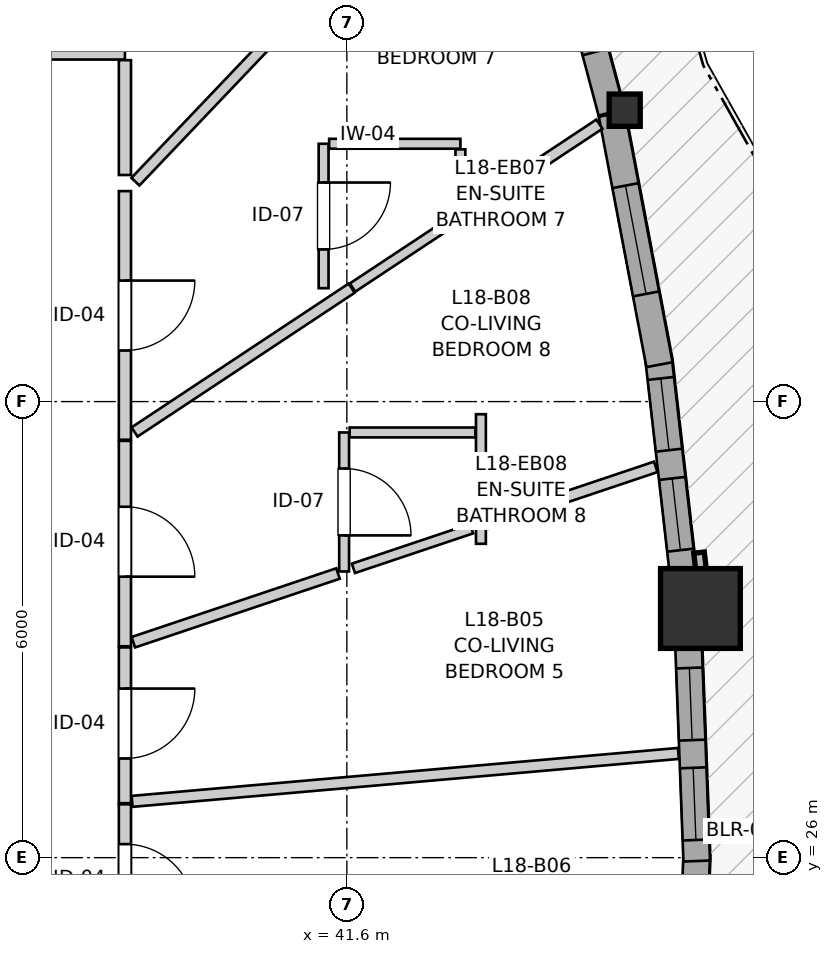
"""IFC4 building model, lengths in metres.
Left out: names, types, materials, properties, quantities, classifications, styles, units other than length and angle.
Written with IfcOpenShell. Run it as: python <this file> out.ifc"""

import sys

from ifc_helpers import new_model, si_unit, direction, frame, frame_2d, origin, origin_2d, place, context, subcontext, project, spatial, rectangle, i_section, extrude, source, transform, mapped, element, fill, save


model = new_model("IFC4")
c1 = context("Model", 3, precision=1e-05, world=origin(), true_north=direction((0.0, 1.0)))
c2 = subcontext(c1, "Body", "Model", "MODEL_VIEW")
j1 = project(units=[si_unit("LENGTHUNIT", "METRE"), si_unit("PLANEANGLEUNIT", "RADIAN")], contexts=[c1])
p1 = place(None, origin())
s1 = spatial("IfcSite", under=j1, at=p1, CompositionType="ELEMENT")
p2 = place(p1, origin())
s2 = spatial("IfcBuilding", under=s1, at=p2, CompositionType="ELEMENT")
p3 = place(p2, frame((0.0, 0.0, 62.2)))
s3 = spatial("IfcBuildingStorey", under=s2, at=p3, CompositionType="ELEMENT", Elevation=62.2)
m1 = source(origin(), c2, "Body", "SweptSolid", [
    extrude(rectangle(XDim=1.05, YDim=1.05, at=origin_2d()), origin(), (0.0, 0.0, 1.0), 2.9),
])
p4 = place(p3, frame((46.252, 29.278, 0.0), z_axis=(0.0, 0.0, 1.0), x_axis=(1.0, 0.0, 0.0)))
e1 = element("IfcColumn", 1, at=p4, inside=s3, PredefinedType="COLUMN", context=c2, shape_type="MappedRepresentation", body=[
    mapped(m1, transform((0.0, 0.0, 0.0), x_axis=(1.0, 0.0, 0.0), y_axis=(0.0, 1.0, 0.0), z_axis=(0.0, 0.0, 1.0), scale=1.0)),
])
m2 = source(origin(), c2, "Body", "SweptSolid", [
    extrude(i_section(OverallWidth=0.409, OverallDepth=0.425, WebThickness=0.03, FlangeThickness=0.048, FilletRadius=0.015, at=origin_2d()), origin(), (0.0, 0.0, 1.0), 2.9),
])
p5 = place(p3, frame((45.256, 35.834, 0.0), z_axis=(0.0, 0.0, 1.0), x_axis=(1.0, 0.0, 0.0)))
e2 = element("IfcColumn", 2, at=p5, inside=s3, PredefinedType="PILASTER", context=c2, shape_type="MappedRepresentation", body=[
    mapped(m2, transform((0.0, 0.0, 0.0), x_axis=(1.0, 0.0, 0.0), y_axis=(0.0, 1.0, 0.0), z_axis=(0.0, 0.0, 1.0), scale=1.0)),
])
p6 = place(p3, frame((46.078, 22.749, 0.0), z_axis=(0.0, 0.0, 1.0), x_axis=(0.037972593677, 0.999278780986, 0.0)))
e3 = element("IfcWall", 3, at=p6, inside=s3, PredefinedType="SOLIDWALL", context=c2, shape_type="SweptSolid", body=[
    extrude(rectangle(XDim=3.298, YDim=0.35, at=frame_2d((1.649, 0.0))), origin(), (0.0, 0.0, 1.0), 2.38),
])
p7 = place(p6, frame((1.394, 0.0, 0.82)))
e4 = element("IfcOpeningElement", 4, at=p7, cuts=e3, PredefinedType="OPENING", context=c2, shape_type="SweptSolid", body=[
    extrude(rectangle(XDim=1.25, YDim=1.35, at=frame_2d((0.625, 0.675))), frame((0.0, 0.185, 0.0), z_axis=(0.0, -1.0, 0.0), x_axis=(1.0, 0.0, 0.0)), (0.0, 0.0, 1.0), 0.37),
])
p8 = place(p3, frame((46.203, 25.955, 0.0), z_axis=(0.0, 0.0, 1.0), x_axis=(-0.038016855762, 0.999277098045, 0.0)))
e5 = element("IfcWall", 5, at=p8, inside=s3, PredefinedType="SOLIDWALL", context=c2, shape_type="SweptSolid", body=[
    extrude(rectangle(XDim=3.018, YDim=0.35, at=frame_2d((1.509, 0.0))), origin(), (0.0, 0.0, 1.0), 2.38),
])
p9 = place(p8, frame((0.277, 0.0, 0.82)))
e6 = element("IfcOpeningElement", 6, at=p9, cuts=e5, PredefinedType="OPENING", context=c2, shape_type="SweptSolid", body=[
    extrude(rectangle(XDim=0.95, YDim=1.35, at=frame_2d((0.475, 0.675))), frame((0.0, 0.185, 0.0), z_axis=(0.0, -1.0, 0.0), x_axis=(1.0, 0.0, 0.0)), (0.0, 0.0, 1.0), 0.37),
])
p10 = place(p8, frame((1.592, 0.0, 0.82)))
e7 = element("IfcOpeningElement", 7, at=p10, cuts=e5, PredefinedType="OPENING", context=c2, shape_type="SweptSolid", body=[
    extrude(rectangle(XDim=0.95, YDim=1.35, at=frame_2d((0.475, 0.675))), frame((0.0, 0.185, 0.0), z_axis=(0.0, -1.0, 0.0), x_axis=(1.0, 0.0, 0.0)), (0.0, 0.0, 1.0), 0.37),
])
p11 = place(p3, frame((46.044, 29.556, 0.0), z_axis=(0.0, 0.0, 1.0), x_axis=(-0.113263196818, 0.993565019637, 0.0)))
e8 = element("IfcWall", 8, at=p11, inside=s3, PredefinedType="SOLIDWALL", context=c2, shape_type="SweptSolid", body=[
    extrude(rectangle(XDim=3.037, YDim=0.35, at=frame_2d((1.519, 0.0))), origin(), (0.0, 0.0, 1.0), 2.38),
])
p12 = place(p11, frame((0.492, 0.0, 0.82)))
e9 = element("IfcOpeningElement", 9, at=p12, cuts=e8, PredefinedType="OPENING", context=c2, shape_type="SweptSolid", body=[
    extrude(rectangle(XDim=0.95, YDim=1.35, at=frame_2d((0.475, 0.675))), frame((0.0, 0.185, 0.0), z_axis=(0.0, -1.0, 0.0), x_axis=(1.0, 0.0, 0.0)), (0.0, 0.0, 1.0), 0.37),
])
p13 = place(p11, frame((1.816, 0.0, 0.82)))
e10 = element("IfcOpeningElement", 10, at=p13, cuts=e8, PredefinedType="OPENING", context=c2, shape_type="SweptSolid", body=[
    extrude(rectangle(XDim=0.95, YDim=1.35, at=frame_2d((0.475, 0.675))), frame((0.0, 0.185, 0.0), z_axis=(0.0, -1.0, 0.0), x_axis=(1.0, 0.0, 0.0)), (0.0, 0.0, 1.0), 0.37),
])
p14 = place(p3, frame((45.713, 32.486, 0.0), z_axis=(0.0, 0.0, 1.0), x_axis=(-0.186603748992, 0.982435260392, 0.0)))
e11 = element("IfcWall", 11, at=p14, inside=s3, PredefinedType="SOLIDWALL", context=c2, shape_type="SweptSolid", body=[
    extrude(rectangle(XDim=3.354, YDim=0.35, at=frame_2d((1.677, 0.0))), origin(), (0.0, 0.0, 1.0), 2.38),
])
p15 = place(p14, frame((0.948, 0.0, 0.82)))
e12 = element("IfcOpeningElement", 12, at=p15, cuts=e11, PredefinedType="OPENING", context=c2, shape_type="SweptSolid", body=[
    extrude(rectangle(XDim=1.45, YDim=1.25, at=frame_2d((0.725, 0.625))), frame((0.0, 0.185, 0.0), z_axis=(0.0, -1.0, 0.0), x_axis=(1.0, 0.0, 0.0)), (0.0, 0.0, 1.0), 0.37),
])
p16 = place(p3, frame((45.081, 35.808, 0.0), z_axis=(0.0, 0.0, 1.0), x_axis=(-0.257114470429, 0.966380954436, 0.0)))
e13 = element("IfcWall", 13, at=p16, inside=s3, PredefinedType="SOLIDWALL", context=c2, shape_type="SweptSolid", body=[
    extrude(rectangle(XDim=3.41, YDim=0.35, at=frame_2d((1.705, 0.0))), origin(), (0.0, 0.0, 1.0), 2.38),
])
p17 = place(p16, frame((0.82, 0.0, 0.82)))
e14 = element("IfcOpeningElement", 14, at=p17, cuts=e13, PredefinedType="OPENING", context=c2, shape_type="SweptSolid", body=[
    extrude(rectangle(XDim=1.75, YDim=1.3, at=frame_2d((0.875, 0.65))), frame((0.0, 0.185, 0.0), z_axis=(0.0, -1.0, 0.0), x_axis=(1.0, 0.0, 0.0)), (0.0, 0.0, 1.0), 0.37),
])
p18 = place(p3, frame((35.011, 36.58, 0.0), z_axis=(0.0, 0.0, 1.0), x_axis=(1.0, 0.0, 0.0)))
e15 = element("IfcWall", 15, at=p18, inside=s3, PredefinedType="PARTITIONING", context=c2, shape_type="SweptSolid", body=[
    extrude(rectangle(XDim=3.669, YDim=0.16, at=frame_2d((1.834, 0.0))), origin(), (0.0, 0.0, 1.0), 2.9),
])
p19 = place(p18, frame((1.363, 0.0, 0.0)))
e16 = element("IfcOpeningElement", 16, at=p19, cuts=e15, PredefinedType="OPENING", context=c2, shape_type="SweptSolid", body=[
    extrude(rectangle(XDim=0.96, YDim=2.1, at=frame_2d((0.48, 1.05))), frame((0.0, 0.09, 0.0), z_axis=(0.0, -1.0, 0.0), x_axis=(1.0, 0.0, 0.0)), (0.0, 0.0, 1.0), 0.18),
])
p20 = place(p3, frame((38.68, 34.769, 0.0), z_axis=(0.0, 0.0, 1.0), x_axis=(0.0, -1.0, 0.0)))
e17 = element("IfcWall", 17, at=p20, inside=s3, PredefinedType="PARTITIONING", context=c2, shape_type="SweptSolid", body=[
    extrude(rectangle(XDim=3.271, YDim=0.16, at=frame_2d((1.635, 0.0))), origin(), (0.0, 0.0, 1.0), 2.9),
])
p21 = place(p20, frame((1.177, 0.0, 0.0)))
e18 = element("IfcOpeningElement", 18, at=p21, cuts=e17, PredefinedType="OPENING", context=c2, shape_type="SweptSolid", body=[
    extrude(rectangle(XDim=0.92, YDim=2.1, at=frame_2d((0.46, 1.05))), frame((0.0, 0.09, 0.0), z_axis=(0.0, -1.0, 0.0), x_axis=(1.0, 0.0, 0.0)), (0.0, 0.0, 1.0), 0.18),
])
p22 = place(p3, frame((38.68, 31.483, 0.0), z_axis=(0.0, 0.0, 1.0), x_axis=(0.0, -1.0, 0.0)))
e19 = element("IfcWall", 19, at=p22, inside=s3, PredefinedType="PARTITIONING", context=c2, shape_type="SweptSolid", body=[
    extrude(rectangle(XDim=2.702, YDim=0.16, at=frame_2d((1.351, 0.0))), origin(), (0.0, 0.0, 1.0), 2.9),
])
p23 = place(p22, frame((0.866, 0.0, 0.0)))
e20 = element("IfcOpeningElement", 20, at=p23, cuts=e19, PredefinedType="OPENING", context=c2, shape_type="SweptSolid", body=[
    extrude(rectangle(XDim=0.92, YDim=2.1, at=frame_2d((0.46, 1.05))), frame((0.0, 0.09, 0.0), z_axis=(0.0, -1.0, 0.0), x_axis=(1.0, 0.0, 0.0)), (0.0, 0.0, 1.0), 0.18),
])
p24 = place(p3, frame((38.68, 28.766, 0.0), z_axis=(0.0, 0.0, 1.0), x_axis=(0.0, -1.0, 0.0)))
e21 = element("IfcWall", 21, at=p24, inside=s3, PredefinedType="PARTITIONING", context=c2, shape_type="SweptSolid", body=[
    extrude(rectangle(XDim=2.049, YDim=0.16, at=frame_2d((1.024, 0.0))), origin(), (0.0, 0.0, 1.0), 2.9),
])
p25 = place(p24, frame((0.542, 0.0, 0.0)))
e22 = element("IfcOpeningElement", 22, at=p25, cuts=e21, PredefinedType="OPENING", context=c2, shape_type="SweptSolid", body=[
    extrude(rectangle(XDim=0.92, YDim=2.1, at=frame_2d((0.46, 1.05))), frame((0.0, 0.09, 0.0), z_axis=(0.0, -1.0, 0.0), x_axis=(1.0, 0.0, 0.0)), (0.0, 0.0, 1.0), 0.18),
])
p26 = place(p3, frame((38.68, 26.702, 0.0), z_axis=(0.0, 0.0, 1.0), x_axis=(0.0, -1.0, 0.0)))
e23 = element("IfcWall", 23, at=p26, inside=s3, PredefinedType="PARTITIONING", context=c2, shape_type="SweptSolid", body=[
    extrude(rectangle(XDim=1.967, YDim=0.16, at=frame_2d((0.983, 0.0))), origin(), (0.0, 0.0, 1.0), 2.9),
])
p27 = place(p26, frame((0.524, 0.0, 0.0)))
e24 = element("IfcOpeningElement", 24, at=p27, cuts=e23, PredefinedType="OPENING", context=c2, shape_type="SweptSolid", body=[
    extrude(rectangle(XDim=0.92, YDim=2.1, at=frame_2d((0.46, 1.05))), frame((0.0, 0.09, 0.0), z_axis=(0.0, -1.0, 0.0), x_axis=(1.0, 0.0, 0.0)), (0.0, 0.0, 1.0), 0.18),
])
p28 = place(p3, frame((41.294, 35.392, 0.0), z_axis=(0.0, 0.0, 1.0), x_axis=(0.0, -1.0, 0.0)))
e25 = element("IfcWall", 25, at=p28, inside=s3, PredefinedType="PARTITIONING", context=c2, shape_type="SweptSolid", body=[
    extrude(rectangle(XDim=1.9, YDim=0.13, at=frame_2d((0.95, 0.0))), origin(), (0.0, 0.0, 1.0), 2.9),
])
p29 = place(p28, frame((0.51, 0.0, 0.0)))
e26 = element("IfcOpeningElement", 26, at=p29, cuts=e25, PredefinedType="OPENING", context=c2, shape_type="SweptSolid", body=[
    extrude(rectangle(XDim=0.88, YDim=2.05, at=frame_2d((0.44, 1.025))), frame((0.0, 0.075, 0.0), z_axis=(0.0, -1.0, 0.0), x_axis=(1.0, 0.0, 0.0)), (0.0, 0.0, 1.0), 0.15),
])
p30 = place(p3, frame((41.564, 31.594, 0.0), z_axis=(0.0, 0.0, 1.0), x_axis=(0.0, -1.0, 0.0)))
e27 = element("IfcWall", 27, at=p30, inside=s3, PredefinedType="PARTITIONING", context=c2, shape_type="SweptSolid", body=[
    extrude(rectangle(XDim=1.829, YDim=0.13, at=frame_2d((0.915, 0.0))), origin(), (0.0, 0.0, 1.0), 2.9),
])
p31 = place(p30, frame((0.475, 0.0, 0.0)))
e28 = element("IfcOpeningElement", 28, at=p31, cuts=e27, PredefinedType="OPENING", context=c2, shape_type="SweptSolid", body=[
    extrude(rectangle(XDim=0.88, YDim=2.05, at=frame_2d((0.44, 1.025))), frame((0.0, 0.075, 0.0), z_axis=(0.0, -1.0, 0.0), x_axis=(1.0, 0.0, 0.0)), (0.0, 0.0, 1.0), 0.15),
])
p32 = place(p3, frame((38.774, 26.74, 0.0), z_axis=(0.0, 0.0, 1.0), x_axis=(0.99617095107, 0.087426747871, 0.0)))
e29 = element("IfcWall", 29, at=p32, inside=s3, PredefinedType="PARTITIONING", context=c2, shape_type="SweptSolid", body=[
    extrude(rectangle(XDim=7.216, YDim=0.145, at=frame_2d((3.608, 0.0))), origin(), (0.0, 0.0, 1.0), 2.9),
])
p33 = place(p3, frame((38.818, 34.893, 0.0), z_axis=(0.0, 0.0, 1.0), x_axis=(0.68961378572, 0.724177344678, 0.0)))
e30 = element("IfcWall", 30, at=p33, inside=s3, PredefinedType="PARTITIONING", context=c2, shape_type="SweptSolid", body=[
    extrude(rectangle(XDim=7.071, YDim=0.145, at=frame_2d((3.535, 0.0))), origin(), (0.0, 0.0, 1.0), 2.9),
])
p34 = place(p3, frame((38.807, 31.6, 0.0), z_axis=(0.0, 0.0, 1.0), x_axis=(0.833690999351, 0.552231217518, 0.0)))
e31 = element("IfcWall", 31, at=p34, inside=s3, PredefinedType="PARTITIONING", context=c2, shape_type="SweptSolid", body=[
    extrude(rectangle(XDim=3.426, YDim=0.145, at=frame_2d((1.713, 0.0))), origin(), (0.0, 0.0, 1.0), 2.9),
])
p35 = place(p3, frame((38.791, 28.834, 0.0), z_axis=(0.0, 0.0, 1.0), x_axis=(0.94801935148, 0.318212679226, 0.0)))
e32 = element("IfcWall", 32, at=p35, inside=s3, PredefinedType="PARTITIONING", context=c2, shape_type="SweptSolid", body=[
    extrude(rectangle(XDim=2.84, YDim=0.145, at=frame_2d((1.42, 0.0))), origin(), (0.0, 0.0, 1.0), 2.9),
])
p36 = place(p3, frame((43.445, 30.396, 0.0), z_axis=(0.0, 0.0, 1.0), x_axis=(0.947971837268, 0.318354198568, 0.0)))
e33 = element("IfcWall", 33, at=p36, inside=s3, PredefinedType="PARTITIONING", context=c2, shape_type="SweptSolid", body=[
    extrude(rectangle(XDim=2.341, YDim=0.145, at=frame_2d((1.171, 0.0))), origin(), (0.0, 0.0, 1.0), 2.9),
])
p37 = place(p3, frame((43.094, 34.439, 0.0), z_axis=(0.0, 0.0, 1.0), x_axis=(0.833690342454, 0.552232209219, 0.0)))
e34 = element("IfcWall", 34, at=p37, inside=s3, PredefinedType="PARTITIONING", context=c2, shape_type="SweptSolid", body=[
    extrude(rectangle(XDim=2.194, YDim=0.145, at=frame_2d((1.097, 0.0))), origin(), (0.0, 0.0, 1.0), 2.9),
])
p38 = place(p3, frame((41.687, 29.806, 0.0), z_axis=(0.0, 0.0, 1.0), x_axis=(0.948056253842, 0.318102718553, 0.0)))
e35 = element("IfcWall", 35, at=p38, inside=s3, PredefinedType="PARTITIONING", context=c2, shape_type="SweptSolid", body=[
    extrude(rectangle(XDim=1.64, YDim=0.13, at=frame_2d((0.82, 0.0))), origin(), (0.0, 0.0, 1.0), 2.9),
])
p39 = place(p3, frame((41.367, 35.392, 0.0), z_axis=(0.0, 0.0, 1.0), x_axis=(1.0, 0.0, 0.0)))
e36 = element("IfcWall", 36, at=p39, inside=s3, PredefinedType="PARTITIONING", context=c2, shape_type="SweptSolid", body=[
    extrude(rectangle(XDim=1.727, YDim=0.13, at=frame_2d((0.864, 0.0))), origin(), (0.0, 0.0, 1.0), 2.9),
])
p40 = place(p3, frame((41.637, 31.594, 0.0), z_axis=(0.0, 0.0, 1.0), x_axis=(1.0, 0.0, 0.0)))
e37 = element("IfcWall", 37, at=p40, inside=s3, PredefinedType="PARTITIONING", context=c2, shape_type="SweptSolid", body=[
    extrude(rectangle(XDim=1.654, YDim=0.13, at=frame_2d((0.827, 0.0))), origin(), (0.0, 0.0, 1.0), 2.9),
])
p41 = place(p3, frame((38.68, 34.981, 0.0), z_axis=(0.0, 0.0, 1.0), x_axis=(0.0, 1.0, 0.0)))
e38 = element("IfcWall", 38, at=p41, inside=s3, PredefinedType="PARTITIONING", context=c2, shape_type="SweptSolid", body=[
    extrude(rectangle(XDim=1.511, YDim=0.16, at=frame_2d((0.755, 0.0))), origin(), (0.0, 0.0, 1.0), 2.9),
])
p42 = place(p3, frame((41.676, 33.5, 0.0), z_axis=(0.0, 0.0, 1.0), x_axis=(0.833939065936, 0.55185653417, 0.0)))
e39 = element("IfcWall", 39, at=p42, inside=s3, PredefinedType="PARTITIONING", context=c2, shape_type="SweptSolid", body=[
    extrude(rectangle(XDim=1.686, YDim=0.13, at=frame_2d((0.843, 0.0))), origin(), (0.0, 0.0, 1.0), 2.9),
])
p43 = place(p3, frame((43.364, 30.129, 0.0), z_axis=(0.0, 0.0, 1.0), x_axis=(0.0, 1.0, 0.0)))
e40 = element("IfcWall", 40, at=p43, inside=s3, PredefinedType="PARTITIONING", context=c2, shape_type="SweptSolid", body=[
    extrude(rectangle(XDim=1.705, YDim=0.13, at=frame_2d((0.853, 0.0))), origin(), (0.0, 0.0, 1.0), 2.9),
])
p44 = place(p3, frame((43.094, 34.577, 0.0), z_axis=(0.0, 0.0, 1.0), x_axis=(0.0, 1.0, 0.0)))
e41 = element("IfcWall", 41, at=p44, inside=s3, PredefinedType="PARTITIONING", context=c2, shape_type="SweptSolid", body=[
    extrude(rectangle(XDim=0.742, YDim=0.13, at=frame_2d((0.371, 0.0))), origin(), (0.0, 0.0, 1.0), 2.9),
])
m3 = source(origin(), c2, "Body", "SweptSolid", [
    extrude(rectangle(XDim=0.95, YDim=1.35, at=frame_2d((0.475, 0.675))), frame((0.0, 0.03, 0.0), z_axis=(0.0, -1.0, 0.0), x_axis=(1.0, 0.0, 0.0)), (0.0, 0.0, 1.0), 0.06),
])
p45 = place(p9, origin())
e42 = element("IfcWindow", 42, at=p45, inside=s3, PartitioningType="SINGLE_PANEL", PredefinedType="WINDOW", context=c2, shape_type="MappedRepresentation", body=[
    mapped(m3, transform((0.0, 0.0, 0.0), x_axis=(1.0, 0.0, 0.0), y_axis=(0.0, 1.0, 0.0), z_axis=(0.0, 0.0, 1.0), scale=1.0)),
])
fill(e6, e42)
p46 = place(p10, origin())
e43 = element("IfcWindow", 43, at=p46, inside=s3, PartitioningType="SINGLE_PANEL", PredefinedType="WINDOW", context=c2, shape_type="MappedRepresentation", body=[
    mapped(m3, transform((0.0, 0.0, 0.0), x_axis=(1.0, 0.0, 0.0), y_axis=(0.0, 1.0, 0.0), z_axis=(0.0, 0.0, 1.0), scale=1.0)),
])
fill(e7, e43)
p47 = place(p12, origin())
e44 = element("IfcWindow", 44, at=p47, inside=s3, PartitioningType="SINGLE_PANEL", PredefinedType="WINDOW", context=c2, shape_type="MappedRepresentation", body=[
    mapped(m3, transform((0.0, 0.0, 0.0), x_axis=(1.0, 0.0, 0.0), y_axis=(0.0, 1.0, 0.0), z_axis=(0.0, 0.0, 1.0), scale=1.0)),
])
fill(e9, e44)
p48 = place(p13, origin())
e45 = element("IfcWindow", 45, at=p48, inside=s3, PartitioningType="SINGLE_PANEL", PredefinedType="WINDOW", context=c2, shape_type="MappedRepresentation", body=[
    mapped(m3, transform((0.0, 0.0, 0.0), x_axis=(1.0, 0.0, 0.0), y_axis=(0.0, 1.0, 0.0), z_axis=(0.0, 0.0, 1.0), scale=1.0)),
])
fill(e10, e45)
m4 = source(origin(), c2, "Body", "SweptSolid", [
    extrude(rectangle(XDim=1.45, YDim=1.25, at=frame_2d((0.725, 0.625))), frame((0.0, 0.03, 0.0), z_axis=(0.0, -1.0, 0.0), x_axis=(1.0, 0.0, 0.0)), (0.0, 0.0, 1.0), 0.06),
])
p49 = place(p15, origin())
e46 = element("IfcWindow", 46, at=p49, inside=s3, PartitioningType="SINGLE_PANEL", PredefinedType="WINDOW", context=c2, shape_type="MappedRepresentation", body=[
    mapped(m4, transform((0.0, 0.0, 0.0), x_axis=(1.0, 0.0, 0.0), y_axis=(0.0, 1.0, 0.0), z_axis=(0.0, 0.0, 1.0), scale=1.0)),
])
fill(e12, e46)
m5 = source(origin(), c2, "Body", "SweptSolid", [
    extrude(rectangle(XDim=1.75, YDim=1.3, at=frame_2d((0.875, 0.65))), frame((0.0, 0.03, 0.0), z_axis=(0.0, -1.0, 0.0), x_axis=(1.0, 0.0, 0.0)), (0.0, 0.0, 1.0), 0.06),
])
p50 = place(p17, origin())
e47 = element("IfcWindow", 47, at=p50, inside=s3, PartitioningType="SINGLE_PANEL", PredefinedType="WINDOW", context=c2, shape_type="MappedRepresentation", body=[
    mapped(m5, transform((0.0, 0.0, 0.0), x_axis=(1.0, 0.0, 0.0), y_axis=(0.0, 1.0, 0.0), z_axis=(0.0, 0.0, 1.0), scale=1.0)),
])
fill(e14, e47)
m6 = source(origin(), c2, "Body", "SweptSolid", [
    extrude(rectangle(XDim=0.92, YDim=2.1, at=frame_2d((0.46, 1.05))), frame((0.0, 0.025, 0.0), z_axis=(0.0, -1.0, 0.0), x_axis=(1.0, 0.0, 0.0)), (0.0, 0.0, 1.0), 0.05),
])
p51 = place(p21, origin())
e48 = element("IfcDoor", 48, at=p51, inside=s3, OperationType="SINGLE_SWING_LEFT", PredefinedType="DOOR", context=c2, shape_type="MappedRepresentation", body=[
    mapped(m6, transform((0.0, 0.0, 0.0), x_axis=(1.0, 0.0, 0.0), y_axis=(0.0, 1.0, 0.0), z_axis=(0.0, 0.0, 1.0), scale=1.0)),
])
fill(e18, e48)
p52 = place(p23, origin())
e49 = element("IfcDoor", 49, at=p52, inside=s3, OperationType="SINGLE_SWING_RIGHT", PredefinedType="DOOR", context=c2, shape_type="MappedRepresentation", body=[
    mapped(m6, transform((0.0, 0.0, 0.0), x_axis=(1.0, 0.0, 0.0), y_axis=(0.0, 1.0, 0.0), z_axis=(0.0, 0.0, 1.0), scale=1.0)),
])
fill(e20, e49)
p53 = place(p25, origin())
e50 = element("IfcDoor", 50, at=p53, inside=s3, OperationType="SINGLE_SWING_LEFT", PredefinedType="DOOR", context=c2, shape_type="MappedRepresentation", body=[
    mapped(m6, transform((0.0, 0.0, 0.0), x_axis=(1.0, 0.0, 0.0), y_axis=(0.0, 1.0, 0.0), z_axis=(0.0, 0.0, 1.0), scale=1.0)),
])
fill(e22, e50)
p54 = place(p27, origin())
e51 = element("IfcDoor", 51, at=p54, inside=s3, OperationType="SINGLE_SWING_RIGHT", PredefinedType="DOOR", context=c2, shape_type="MappedRepresentation", body=[
    mapped(m6, transform((0.0, 0.0, 0.0), x_axis=(1.0, 0.0, 0.0), y_axis=(0.0, 1.0, 0.0), z_axis=(0.0, 0.0, 1.0), scale=1.0)),
])
fill(e24, e51)
m7 = source(origin(), c2, "Body", "SweptSolid", [
    extrude(rectangle(XDim=0.88, YDim=2.05, at=frame_2d((0.44, 1.025))), frame((0.0, 0.025, 0.0), z_axis=(0.0, -1.0, 0.0), x_axis=(1.0, 0.0, 0.0)), (0.0, 0.0, 1.0), 0.05),
])
p55 = place(p29, origin())
e52 = element("IfcDoor", 52, at=p55, inside=s3, OperationType="SINGLE_SWING_LEFT", PredefinedType="DOOR", context=c2, shape_type="MappedRepresentation", body=[
    mapped(m7, transform((0.0, 0.0, 0.0), x_axis=(1.0, 0.0, 0.0), y_axis=(0.0, 1.0, 0.0), z_axis=(0.0, 0.0, 1.0), scale=1.0)),
])
fill(e26, e52)
p56 = place(p31, origin())
e53 = element("IfcDoor", 53, at=p56, inside=s3, OperationType="SINGLE_SWING_RIGHT", PredefinedType="DOOR", context=c2, shape_type="MappedRepresentation", body=[
    mapped(m7, transform((0.0, 0.0, 0.0), x_axis=(1.0, 0.0, 0.0), y_axis=(0.0, 1.0, 0.0), z_axis=(0.0, 0.0, 1.0), scale=1.0)),
])
fill(e28, e53)
save(model, sys.argv[1])
